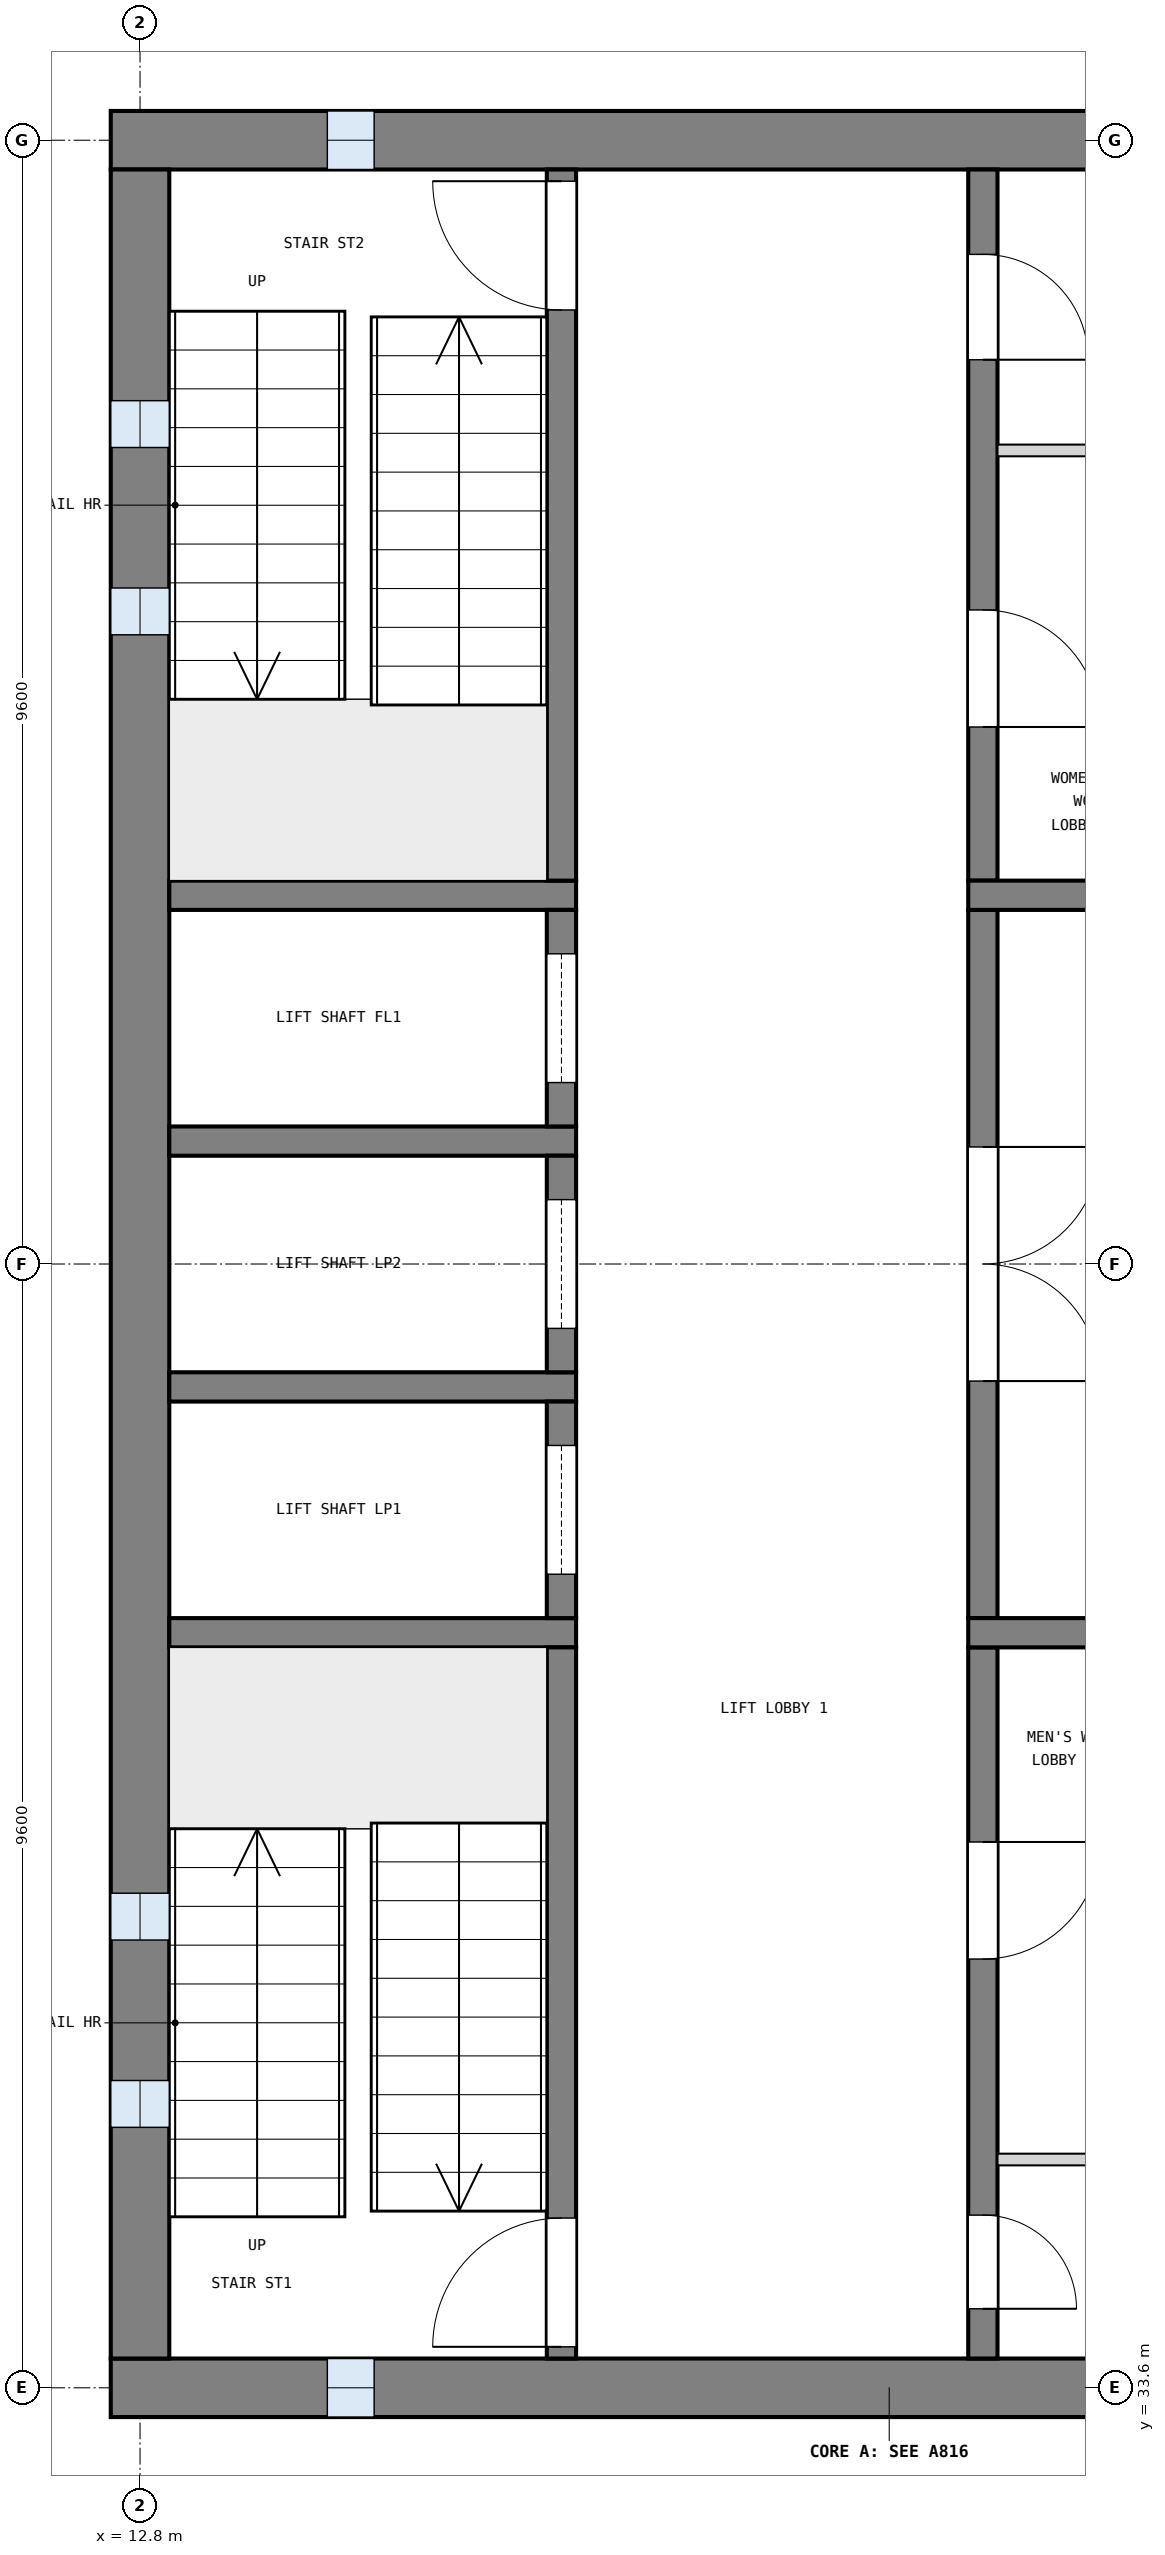
"""IFC4 building model, lengths in metres.
Left out: names, types, materials, properties, quantities, classifications, styles, units other than length and angle.
Written with IfcOpenShell. Run it as: python <this file> out.ifc"""

import sys

from ifc_helpers import new_model, si_unit, direction, frame, frame_2d, origin, place, context, subcontext, project, spatial, rectangle, extrude, element, fill, save


model = new_model("IFC4")
c1 = context("Model", 3, precision=1e-05, world=origin(), true_north=direction((0.0, 1.0)))
c2 = subcontext(c1, "Body", "Model", "MODEL_VIEW")
j1 = project(units=[si_unit("LENGTHUNIT", "METRE"), si_unit("PLANEANGLEUNIT", "RADIAN")], contexts=[c1])
p1 = place(None, origin())
s1 = spatial("IfcSite", under=j1, at=p1, CompositionType="ELEMENT")
p2 = place(p1, origin())
s2 = spatial("IfcBuilding", under=s1, at=p2, CompositionType="ELEMENT")
p3 = place(p2, frame((0.0, 0.0, 56.1)))
s3 = spatial("IfcBuildingStorey", under=s2, at=p3, CompositionType="ELEMENT", Elevation=56.1)
p4 = place(p3, frame((12.55, 52.8, 0.0), z_axis=(0.0, 0.0, 1.0), x_axis=(1.0, 0.0, 0.0)))
e1 = element("IfcWall", 1, at=p4, inside=s3, PredefinedType="SHEAR", context=c2, shape_type="SweptSolid", body=[
    extrude(rectangle(XDim=13.3, YDim=0.5, at=frame_2d((6.65, 0.0))), origin(), (0.0, 0.0, 1.0), 3.9),
])
p5 = place(p4, frame((1.85, 0.0, 1.0)))
e2 = element("IfcOpeningElement", 2, at=p5, cuts=e1, PredefinedType="OPENING", context=c2, shape_type="SweptSolid", body=[
    extrude(rectangle(XDim=0.4, YDim=2.0, at=frame_2d((0.2, 1.0))), frame((0.0, 0.26, 0.0), z_axis=(0.0, -1.0, 0.0), x_axis=(1.0, 0.0, 0.0)), (0.0, 0.0, 1.0), 0.52),
])
p6 = place(p3, frame((12.55, 33.6, 0.0), z_axis=(0.0, 0.0, 1.0), x_axis=(1.0, 0.0, 0.0)))
e3 = element("IfcWall", 3, at=p6, inside=s3, PredefinedType="SHEAR", context=c2, shape_type="SweptSolid", body=[
    extrude(rectangle(XDim=13.3, YDim=0.5, at=frame_2d((6.65, 0.0))), origin(), (0.0, 0.0, 1.0), 3.9),
])
p7 = place(p6, frame((1.85, 0.0, 1.0)))
e4 = element("IfcOpeningElement", 4, at=p7, cuts=e3, PredefinedType="OPENING", context=c2, shape_type="SweptSolid", body=[
    extrude(rectangle(XDim=0.4, YDim=2.0, at=frame_2d((0.2, 1.0))), frame((0.0, 0.26, 0.0), z_axis=(0.0, -1.0, 0.0), x_axis=(1.0, 0.0, 0.0)), (0.0, 0.0, 1.0), 0.52),
])
p8 = place(p3, frame((12.8, 33.85, 0.0), z_axis=(0.0, 0.0, 1.0), x_axis=(0.0, 1.0, 0.0)))
e5 = element("IfcWall", 5, at=p8, inside=s3, PredefinedType="SHEAR", context=c2, shape_type="SweptSolid", body=[
    extrude(rectangle(XDim=18.7, YDim=0.5, at=frame_2d((9.35, 0.0))), origin(), (0.0, 0.0, 1.0), 3.9),
])
p9 = place(p8, frame((1.975, 0.0, 1.0)))
e6 = element("IfcOpeningElement", 6, at=p9, cuts=e5, PredefinedType="OPENING", context=c2, shape_type="SweptSolid", body=[
    extrude(rectangle(XDim=0.4, YDim=2.0, at=frame_2d((0.2, 1.0))), frame((0.0, 0.26, 0.0), z_axis=(0.0, -1.0, 0.0), x_axis=(1.0, 0.0, 0.0)), (0.0, 0.0, 1.0), 0.52),
])
p10 = place(p8, frame((3.575, 0.0, 1.0)))
e7 = element("IfcOpeningElement", 7, at=p10, cuts=e5, PredefinedType="OPENING", context=c2, shape_type="SweptSolid", body=[
    extrude(rectangle(XDim=0.4, YDim=2.0, at=frame_2d((0.2, 1.0))), frame((0.0, 0.26, 0.0), z_axis=(0.0, -1.0, 0.0), x_axis=(1.0, 0.0, 0.0)), (0.0, 0.0, 1.0), 0.52),
])
p11 = place(p8, frame((14.725, 0.0, 1.0)))
e8 = element("IfcOpeningElement", 8, at=p11, cuts=e5, PredefinedType="OPENING", context=c2, shape_type="SweptSolid", body=[
    extrude(rectangle(XDim=0.4, YDim=2.0, at=frame_2d((0.2, 1.0))), frame((0.0, 0.26, 0.0), z_axis=(0.0, -1.0, 0.0), x_axis=(1.0, 0.0, 0.0)), (0.0, 0.0, 1.0), 0.52),
])
p12 = place(p8, frame((16.325, 0.0, 1.0)))
e9 = element("IfcOpeningElement", 9, at=p12, cuts=e5, PredefinedType="OPENING", context=c2, shape_type="SweptSolid", body=[
    extrude(rectangle(XDim=0.4, YDim=2.0, at=frame_2d((0.2, 1.0))), frame((0.0, 0.26, 0.0), z_axis=(0.0, -1.0, 0.0), x_axis=(1.0, 0.0, 0.0)), (0.0, 0.0, 1.0), 0.52),
])
for number, where, z_axis, x_axis in (
    (10, (13.05, 40.05, 0.0), (0.0, 0.0, 1.0), (1.0, 0.0, 0.0)),
    (11, (13.05, 42.15, 0.0), (0.0, 0.0, 1.0), (1.0, 0.0, 0.0)),
    (12, (13.05, 44.25, 0.0), (0.0, 0.0, 1.0), (1.0, 0.0, 0.0)),
    (13, (13.05, 46.35, 0.0), (0.0, 0.0, 1.0), (1.0, 0.0, 0.0)),
):
    element("IfcWall", number, at=place(p3, frame(where, z_axis=z_axis, x_axis=x_axis)), inside=s3, PredefinedType="SOLIDWALL", context=c2, shape_type="SweptSolid", body=[
        extrude(rectangle(XDim=3.475, YDim=0.25, at=frame_2d((1.737, 0.0))), origin(), (0.0, 0.0, 1.0), 3.6),
    ])
p13 = place(p3, frame((16.4, 33.85, 0.0), z_axis=(0.0, 0.0, 1.0), x_axis=(0.0, 1.0, 0.0)))
e14 = element("IfcWall", 14, at=p13, inside=s3, PredefinedType="SOLIDWALL", context=c2, shape_type="SweptSolid", body=[
    extrude(rectangle(XDim=6.075, YDim=0.25, at=frame_2d((3.038, 0.0))), origin(), (0.0, 0.0, 1.0), 3.6),
])
p14 = place(p13, frame((0.1, 0.0, 0.0)))
e15 = element("IfcOpeningElement", 15, at=p14, cuts=e14, PredefinedType="OPENING", context=c2, shape_type="SweptSolid", body=[
    extrude(rectangle(XDim=1.1, YDim=2.1, at=frame_2d((0.55, 1.05))), frame((0.0, 0.135, 0.0), z_axis=(0.0, -1.0, 0.0), x_axis=(1.0, 0.0, 0.0)), (0.0, 0.0, 1.0), 0.27),
])
p15 = place(p3, frame((16.4, 40.175, 0.0), z_axis=(0.0, 0.0, 1.0), x_axis=(0.0, 1.0, 0.0)))
e16 = element("IfcWall", 16, at=p15, inside=s3, PredefinedType="SOLIDWALL", context=c2, shape_type="SweptSolid", body=[
    extrude(rectangle(XDim=1.85, YDim=0.25, at=frame_2d((0.925, 0.0))), origin(), (0.0, 0.0, 1.0), 3.6),
])
p16 = place(p15, frame((0.375, 0.0, 0.0)))
e17 = element("IfcOpeningElement", 17, at=p16, cuts=e16, PredefinedType="OPENING", context=c2, shape_type="SweptSolid", body=[
    extrude(rectangle(XDim=1.1, YDim=2.1, at=frame_2d((0.55, 1.05))), frame((0.0, 0.135, 0.0), z_axis=(0.0, -1.0, 0.0), x_axis=(1.0, 0.0, 0.0)), (0.0, 0.0, 1.0), 0.27),
])
p17 = place(p3, frame((16.4, 42.275, 0.0), z_axis=(0.0, 0.0, 1.0), x_axis=(0.0, 1.0, 0.0)))
e18 = element("IfcWall", 18, at=p17, inside=s3, PredefinedType="SOLIDWALL", context=c2, shape_type="SweptSolid", body=[
    extrude(rectangle(XDim=1.85, YDim=0.25, at=frame_2d((0.925, 0.0))), origin(), (0.0, 0.0, 1.0), 3.6),
])
p18 = place(p17, frame((0.375, 0.0, 0.0)))
e19 = element("IfcOpeningElement", 19, at=p18, cuts=e18, PredefinedType="OPENING", context=c2, shape_type="SweptSolid", body=[
    extrude(rectangle(XDim=1.1, YDim=2.1, at=frame_2d((0.55, 1.05))), frame((0.0, 0.135, 0.0), z_axis=(0.0, -1.0, 0.0), x_axis=(1.0, 0.0, 0.0)), (0.0, 0.0, 1.0), 0.27),
])
p19 = place(p3, frame((16.4, 44.375, 0.0), z_axis=(0.0, 0.0, 1.0), x_axis=(0.0, 1.0, 0.0)))
e20 = element("IfcWall", 20, at=p19, inside=s3, PredefinedType="SOLIDWALL", context=c2, shape_type="SweptSolid", body=[
    extrude(rectangle(XDim=1.85, YDim=0.25, at=frame_2d((0.925, 0.0))), origin(), (0.0, 0.0, 1.0), 3.6),
])
p20 = place(p19, frame((0.375, 0.0, 0.0)))
e21 = element("IfcOpeningElement", 21, at=p20, cuts=e20, PredefinedType="OPENING", context=c2, shape_type="SweptSolid", body=[
    extrude(rectangle(XDim=1.1, YDim=2.1, at=frame_2d((0.55, 1.05))), frame((0.0, 0.135, 0.0), z_axis=(0.0, -1.0, 0.0), x_axis=(1.0, 0.0, 0.0)), (0.0, 0.0, 1.0), 0.27),
])
p21 = place(p3, frame((16.4, 46.475, 0.0), z_axis=(0.0, 0.0, 1.0), x_axis=(0.0, 1.0, 0.0)))
e22 = element("IfcWall", 22, at=p21, inside=s3, PredefinedType="SOLIDWALL", context=c2, shape_type="SweptSolid", body=[
    extrude(rectangle(XDim=6.075, YDim=0.25, at=frame_2d((3.038, 0.0))), origin(), (0.0, 0.0, 1.0), 3.6),
])
p22 = place(p21, frame((4.875, 0.0, 0.0)))
e23 = element("IfcOpeningElement", 23, at=p22, cuts=e22, PredefinedType="OPENING", context=c2, shape_type="SweptSolid", body=[
    extrude(rectangle(XDim=1.1, YDim=2.1, at=frame_2d((0.55, 1.05))), frame((0.0, 0.135, 0.0), z_axis=(0.0, -1.0, 0.0), x_axis=(1.0, 0.0, 0.0)), (0.0, 0.0, 1.0), 0.27),
])
p23 = place(p3, frame((20.0, 33.85, 0.0), z_axis=(0.0, 0.0, 1.0), x_axis=(0.0, 1.0, 0.0)))
e24 = element("IfcWall", 24, at=p23, inside=s3, PredefinedType="SOLIDWALL", context=c2, shape_type="SweptSolid", body=[
    extrude(rectangle(XDim=6.075, YDim=0.25, at=frame_2d((3.038, 0.0))), origin(), (0.0, 0.0, 1.0), 3.6),
])
p24 = place(p23, frame((0.425, 0.0, 0.0)))
e25 = element("IfcOpeningElement", 25, at=p24, cuts=e24, PredefinedType="OPENING", context=c2, shape_type="SweptSolid", body=[
    extrude(rectangle(XDim=0.8, YDim=2.1, at=frame_2d((0.4, 1.05))), frame((0.0, 0.135, 0.0), z_axis=(0.0, -1.0, 0.0), x_axis=(1.0, 0.0, 0.0)), (0.0, 0.0, 1.0), 0.27),
])
p25 = place(p23, frame((3.413, 0.0, 0.0)))
e26 = element("IfcOpeningElement", 26, at=p25, cuts=e24, PredefinedType="OPENING", context=c2, shape_type="SweptSolid", body=[
    extrude(rectangle(XDim=1.0, YDim=2.1, at=frame_2d((0.5, 1.05))), frame((0.0, 0.135, 0.0), z_axis=(0.0, -1.0, 0.0), x_axis=(1.0, 0.0, 0.0)), (0.0, 0.0, 1.0), 0.27),
])
p26 = place(p3, frame((20.0, 40.175, 0.0), z_axis=(0.0, 0.0, 1.0), x_axis=(0.0, 1.0, 0.0)))
e27 = element("IfcWall", 27, at=p26, inside=s3, PredefinedType="SOLIDWALL", context=c2, shape_type="SweptSolid", body=[
    extrude(rectangle(XDim=6.05, YDim=0.25, at=frame_2d((3.025, 0.0))), origin(), (0.0, 0.0, 1.0), 3.6),
])
p27 = place(p26, frame((2.025, 0.0, 0.0)))
e28 = element("IfcOpeningElement", 28, at=p27, cuts=e27, PredefinedType="OPENING", context=c2, shape_type="SweptSolid", body=[
    extrude(rectangle(XDim=2.0, YDim=2.1, at=frame_2d((1.0, 1.05))), frame((0.0, 0.135, 0.0), z_axis=(0.0, -1.0, 0.0), x_axis=(1.0, 0.0, 0.0)), (0.0, 0.0, 1.0), 0.27),
])
p28 = place(p3, frame((20.0, 46.475, 0.0), z_axis=(0.0, 0.0, 1.0), x_axis=(0.0, 1.0, 0.0)))
e29 = element("IfcWall", 29, at=p28, inside=s3, PredefinedType="SOLIDWALL", context=c2, shape_type="SweptSolid", body=[
    extrude(rectangle(XDim=6.075, YDim=0.25, at=frame_2d((3.038, 0.0))), origin(), (0.0, 0.0, 1.0), 3.6),
])
p29 = place(p28, frame((1.312, 0.0, 0.0)))
e30 = element("IfcOpeningElement", 30, at=p29, cuts=e29, PredefinedType="OPENING", context=c2, shape_type="SweptSolid", body=[
    extrude(rectangle(XDim=1.0, YDim=2.1, at=frame_2d((0.5, 1.05))), frame((0.0, 0.135, 0.0), z_axis=(0.0, -1.0, 0.0), x_axis=(1.0, 0.0, 0.0)), (0.0, 0.0, 1.0), 0.27),
])
p30 = place(p28, frame((4.45, 0.0, 0.0)))
e31 = element("IfcOpeningElement", 31, at=p30, cuts=e29, PredefinedType="OPENING", context=c2, shape_type="SweptSolid", body=[
    extrude(rectangle(XDim=0.9, YDim=2.1, at=frame_2d((0.45, 1.05))), frame((0.0, 0.135, 0.0), z_axis=(0.0, -1.0, 0.0), x_axis=(1.0, 0.0, 0.0)), (0.0, 0.0, 1.0), 0.27),
])
for number, where, z_axis, x_axis in (
    (32, (19.875, 40.05, 0.0), (0.0, 0.0, 1.0), (1.0, 0.0, 0.0)),
    (33, (19.875, 46.35, 0.0), (0.0, 0.0, 1.0), (1.0, 0.0, 0.0)),
):
    element("IfcWall", number, at=place(p3, frame(where, z_axis=z_axis, x_axis=x_axis)), inside=s3, PredefinedType="SOLIDWALL", context=c2, shape_type="SweptSolid", body=[
        extrude(rectangle(XDim=5.475, YDim=0.25, at=frame_2d((2.738, 0.0))), origin(), (0.0, 0.0, 1.0), 3.6),
    ])
for number, where, z_axis, x_axis in (
    (34, (20.125, 35.55, 0.0), (0.0, 0.0, 1.0), (1.0, 0.0, 0.0)),
    (35, (20.125, 50.15, 0.0), (0.0, 0.0, 1.0), (1.0, 0.0, 0.0)),
):
    element("IfcWall", number, at=place(p3, frame(where, z_axis=z_axis, x_axis=x_axis)), inside=s3, PredefinedType="PARTITIONING", context=c2, shape_type="SweptSolid", body=[
        extrude(rectangle(XDim=5.225, YDim=0.1, at=frame_2d((2.613, 0.0))), origin(), (0.0, 0.0, 1.0), 3.6),
    ])
p31 = place(p9, origin())
e36 = element("IfcWindow", 36, at=p31, inside=s3, PartitioningType="SINGLE_PANEL", PredefinedType="WINDOW", context=c2, shape_type="SweptSolid", body=[
    extrude(rectangle(XDim=0.4, YDim=2.0, at=frame_2d((0.2, 1.0))), frame((0.0, 0.03, 0.0), z_axis=(0.0, -1.0, 0.0), x_axis=(1.0, 0.0, 0.0)), (0.0, 0.0, 1.0), 0.06),
])
fill(e6, e36)
p32 = place(p10, origin())
e37 = element("IfcWindow", 37, at=p32, inside=s3, PartitioningType="SINGLE_PANEL", PredefinedType="WINDOW", context=c2, shape_type="SweptSolid", body=[
    extrude(rectangle(XDim=0.4, YDim=2.0, at=frame_2d((0.2, 1.0))), frame((0.0, 0.03, 0.0), z_axis=(0.0, -1.0, 0.0), x_axis=(1.0, 0.0, 0.0)), (0.0, 0.0, 1.0), 0.06),
])
fill(e7, e37)
p33 = place(p11, origin())
e38 = element("IfcWindow", 38, at=p33, inside=s3, PartitioningType="SINGLE_PANEL", PredefinedType="WINDOW", context=c2, shape_type="SweptSolid", body=[
    extrude(rectangle(XDim=0.4, YDim=2.0, at=frame_2d((0.2, 1.0))), frame((0.0, 0.03, 0.0), z_axis=(0.0, -1.0, 0.0), x_axis=(1.0, 0.0, 0.0)), (0.0, 0.0, 1.0), 0.06),
])
fill(e8, e38)
p34 = place(p12, origin())
e39 = element("IfcWindow", 39, at=p34, inside=s3, PartitioningType="SINGLE_PANEL", PredefinedType="WINDOW", context=c2, shape_type="SweptSolid", body=[
    extrude(rectangle(XDim=0.4, YDim=2.0, at=frame_2d((0.2, 1.0))), frame((0.0, 0.03, 0.0), z_axis=(0.0, -1.0, 0.0), x_axis=(1.0, 0.0, 0.0)), (0.0, 0.0, 1.0), 0.06),
])
fill(e9, e39)
p35 = place(p7, origin())
e40 = element("IfcWindow", 40, at=p35, inside=s3, PartitioningType="SINGLE_PANEL", PredefinedType="WINDOW", context=c2, shape_type="SweptSolid", body=[
    extrude(rectangle(XDim=0.4, YDim=2.0, at=frame_2d((0.2, 1.0))), frame((0.0, 0.03, 0.0), z_axis=(0.0, -1.0, 0.0), x_axis=(1.0, 0.0, 0.0)), (0.0, 0.0, 1.0), 0.06),
])
fill(e4, e40)
p36 = place(p5, origin())
e41 = element("IfcWindow", 41, at=p36, inside=s3, PartitioningType="SINGLE_PANEL", PredefinedType="WINDOW", context=c2, shape_type="SweptSolid", body=[
    extrude(rectangle(XDim=0.4, YDim=2.0, at=frame_2d((0.2, 1.0))), frame((0.0, 0.03, 0.0), z_axis=(0.0, -1.0, 0.0), x_axis=(1.0, 0.0, 0.0)), (0.0, 0.0, 1.0), 0.06),
])
fill(e2, e41)
p37 = place(p14, origin())
e42 = element("IfcDoor", 42, at=p37, inside=s3, OperationType="SINGLE_SWING_LEFT", PredefinedType="DOOR", context=c2, shape_type="SweptSolid", body=[
    extrude(rectangle(XDim=1.1, YDim=2.1, at=frame_2d((0.55, 1.05))), frame((0.0, 0.025, 0.0), z_axis=(0.0, -1.0, 0.0), x_axis=(1.0, 0.0, 0.0)), (0.0, 0.0, 1.0), 0.05),
])
fill(e15, e42)
p38 = place(p22, origin())
e43 = element("IfcDoor", 43, at=p38, inside=s3, OperationType="SINGLE_SWING_RIGHT", PredefinedType="DOOR", context=c2, shape_type="SweptSolid", body=[
    extrude(rectangle(XDim=1.1, YDim=2.1, at=frame_2d((0.55, 1.05))), frame((0.0, 0.025, 0.0), z_axis=(0.0, -1.0, 0.0), x_axis=(1.0, 0.0, 0.0)), (0.0, 0.0, 1.0), 0.05),
])
fill(e23, e43)
p39 = place(p16, origin())
e44 = element("IfcDoor", 44, at=p39, inside=s3, OperationType="SLIDING_TO_LEFT", PredefinedType="DOOR", context=c2, shape_type="SweptSolid", body=[
    extrude(rectangle(XDim=1.1, YDim=2.1, at=frame_2d((0.55, 1.05))), frame((0.0, 0.025, 0.0), z_axis=(0.0, -1.0, 0.0), x_axis=(1.0, 0.0, 0.0)), (0.0, 0.0, 1.0), 0.05),
])
fill(e17, e44)
p40 = place(p18, origin())
e45 = element("IfcDoor", 45, at=p40, inside=s3, OperationType="SLIDING_TO_LEFT", PredefinedType="DOOR", context=c2, shape_type="SweptSolid", body=[
    extrude(rectangle(XDim=1.1, YDim=2.1, at=frame_2d((0.55, 1.05))), frame((0.0, 0.025, 0.0), z_axis=(0.0, -1.0, 0.0), x_axis=(1.0, 0.0, 0.0)), (0.0, 0.0, 1.0), 0.05),
])
fill(e19, e45)
p41 = place(p20, origin())
e46 = element("IfcDoor", 46, at=p41, inside=s3, OperationType="SLIDING_TO_LEFT", PredefinedType="DOOR", context=c2, shape_type="SweptSolid", body=[
    extrude(rectangle(XDim=1.1, YDim=2.1, at=frame_2d((0.55, 1.05))), frame((0.0, 0.025, 0.0), z_axis=(0.0, -1.0, 0.0), x_axis=(1.0, 0.0, 0.0)), (0.0, 0.0, 1.0), 0.05),
])
fill(e21, e46)
p42 = place(p27, frame((2.0, 0.0, 0.0), z_axis=(0.0, 0.0, 1.0), x_axis=(-1.0, 0.0, 0.0)))
e47 = element("IfcDoor", 47, at=p42, inside=s3, OperationType="DOUBLE_DOOR_SINGLE_SWING", PredefinedType="DOOR", context=c2, shape_type="SweptSolid", body=[
    extrude(rectangle(XDim=2.0, YDim=2.1, at=frame_2d((1.0, 1.05))), frame((0.0, 0.025, 0.0), z_axis=(0.0, -1.0, 0.0), x_axis=(1.0, 0.0, 0.0)), (0.0, 0.0, 1.0), 0.05),
])
fill(e28, e47)
p43 = place(p24, frame((0.8, 0.0, 0.0), z_axis=(0.0, 0.0, 1.0), x_axis=(-1.0, 0.0, 0.0)))
e48 = element("IfcDoor", 48, at=p43, inside=s3, OperationType="SINGLE_SWING_RIGHT", PredefinedType="DOOR", context=c2, shape_type="SweptSolid", body=[
    extrude(rectangle(XDim=0.8, YDim=2.1, at=frame_2d((0.4, 1.05))), frame((0.0, 0.025, 0.0), z_axis=(0.0, -1.0, 0.0), x_axis=(1.0, 0.0, 0.0)), (0.0, 0.0, 1.0), 0.05),
])
fill(e25, e48)
p44 = place(p25, frame((1.0, 0.0, 0.0), z_axis=(0.0, 0.0, 1.0), x_axis=(-1.0, 0.0, 0.0)))
e49 = element("IfcDoor", 49, at=p44, inside=s3, OperationType="SINGLE_SWING_LEFT", PredefinedType="DOOR", context=c2, shape_type="SweptSolid", body=[
    extrude(rectangle(XDim=1.0, YDim=2.1, at=frame_2d((0.5, 1.05))), frame((0.0, 0.025, 0.0), z_axis=(0.0, -1.0, 0.0), x_axis=(1.0, 0.0, 0.0)), (0.0, 0.0, 1.0), 0.05),
])
fill(e26, e49)
p45 = place(p29, frame((1.0, 0.0, 0.0), z_axis=(0.0, 0.0, 1.0), x_axis=(-1.0, 0.0, 0.0)))
e50 = element("IfcDoor", 50, at=p45, inside=s3, OperationType="SINGLE_SWING_RIGHT", PredefinedType="DOOR", context=c2, shape_type="SweptSolid", body=[
    extrude(rectangle(XDim=1.0, YDim=2.1, at=frame_2d((0.5, 1.05))), frame((0.0, 0.025, 0.0), z_axis=(0.0, -1.0, 0.0), x_axis=(1.0, 0.0, 0.0)), (0.0, 0.0, 1.0), 0.05),
])
fill(e30, e50)
p46 = place(p30, frame((0.9, 0.0, 0.0), z_axis=(0.0, 0.0, 1.0), x_axis=(-1.0, 0.0, 0.0)))
e51 = element("IfcDoor", 51, at=p46, inside=s3, OperationType="SINGLE_SWING_RIGHT", PredefinedType="DOOR", context=c2, shape_type="SweptSolid", body=[
    extrude(rectangle(XDim=0.9, YDim=2.1, at=frame_2d((0.45, 1.05))), frame((0.0, 0.025, 0.0), z_axis=(0.0, -1.0, 0.0), x_axis=(1.0, 0.0, 0.0)), (0.0, 0.0, 1.0), 0.05),
])
fill(e31, e51)
save(model, sys.argv[1])
